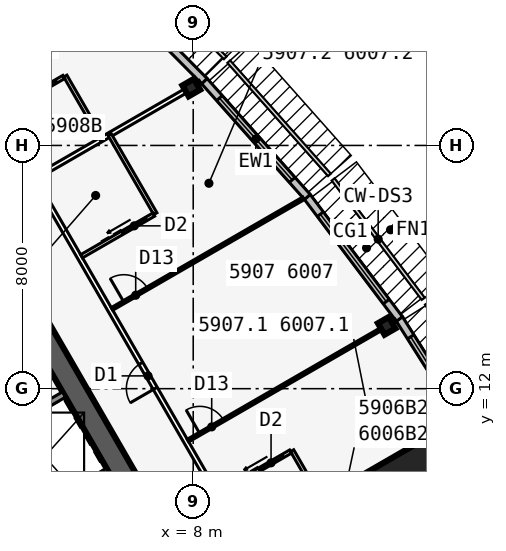
"""IFC4 building model, lengths in metres.
Left out: names, types, materials, properties, quantities, classifications, styles, units other than length and angle.
Written with IfcOpenShell. Run it as: python <this file> out.ifc"""

import sys

from ifc_helpers import new_model, si_unit, direction, frame, frame_2d, origin, origin_2d, place, context, subcontext, project, spatial, rectangle, i_section, extrude, element, fill, save


model = new_model("IFC4")
c1 = context("Model", 3, precision=1e-05, world=origin(), true_north=direction((0.0, 1.0)))
c2 = subcontext(c1, "Body", "Model", "MODEL_VIEW")
j1 = project(units=[si_unit("LENGTHUNIT", "METRE"), si_unit("PLANEANGLEUNIT", "RADIAN")], contexts=[c1])
p1 = place(None, origin())
s1 = spatial("IfcSite", under=j1, at=p1, CompositionType="ELEMENT")
p2 = place(p1, origin())
s2 = spatial("IfcBuilding", under=s1, at=p2, CompositionType="ELEMENT")
p3 = place(p2, frame((0.0, 0.0, 222.5)))
s3 = spatial("IfcBuildingStorey", under=s2, at=p3, CompositionType="ELEMENT", Elevation=222.5)
p4 = place(p3, frame((16.5, -9.526, 0.0), z_axis=(0.0, 0.0, 1.0), x_axis=(-0.499999749417, 0.866025548458, 0.0)))
e1 = element("IfcWall", 1, at=p4, inside=s3, PredefinedType="SHEAR", context=c2, shape_type="SweptSolid", body=[
    extrude(rectangle(XDim=33.0, YDim=0.75, at=frame_2d((16.5, 0.0))), origin(), (0.0, 0.0, 1.0), 3.6),
])
p5 = place(p4, frame((14.15, 0.0, 0.0)))
e2 = element("IfcOpeningElement", 2, at=p5, cuts=e1, PredefinedType="OPENING", context=c2, shape_type="SweptSolid", body=[
    extrude(rectangle(XDim=1.8, YDim=2.13, at=frame_2d((0.9, 1.065))), frame((0.0, 0.385, 0.0), z_axis=(0.0, -1.0, 0.0), x_axis=(1.0, 0.0, 0.0)), (0.0, 0.0, 1.0), 0.77),
])
p6 = place(p4, frame((12.6, 0.0, 0.0)))
e3 = element("IfcOpeningElement", 3, at=p6, cuts=e1, PredefinedType="OPENING", context=c2, shape_type="SweptSolid", body=[
    extrude(rectangle(XDim=1.0, YDim=2.13, at=frame_2d((0.5, 1.065))), frame((0.0, 0.385, 0.0), z_axis=(0.0, -1.0, 0.0), x_axis=(1.0, 0.0, 0.0)), (0.0, 0.0, 1.0), 0.77),
])
p7 = place(p3, frame((5.379, 2.586, 0.0), z_axis=(0.0, 0.0, 1.0), x_axis=(-0.500001375892, 0.866024609411, 0.0)))
e4 = element("IfcWall", 4, at=p7, inside=s3, PredefinedType="SOLIDWALL", context=c2, shape_type="SweptSolid", body=[
    extrude(rectangle(XDim=10.633, YDim=0.25, at=frame_2d((5.316, 0.0))), origin(), (0.0, 0.0, 1.0), 3.435),
])
p8 = place(p7, frame((9.164, 0.0, 0.0)))
e5 = element("IfcOpeningElement", 5, at=p8, cuts=e4, PredefinedType="OPENING", context=c2, shape_type="SweptSolid", body=[
    extrude(rectangle(XDim=0.9, YDim=2.13, at=frame_2d((0.45, 1.065))), frame((0.0, 0.135, 0.0), z_axis=(0.0, -1.0, 0.0), x_axis=(1.0, 0.0, 0.0)), (0.0, 0.0, 1.0), 0.27),
])
p9 = place(p7, frame((1.0, 0.0, 0.0)))
e6 = element("IfcOpeningElement", 6, at=p9, cuts=e4, PredefinedType="OPENING", context=c2, shape_type="SweptSolid", body=[
    extrude(rectangle(XDim=1.1, YDim=2.13, at=frame_2d((0.55, 1.065))), frame((0.0, 0.135, 0.0), z_axis=(0.0, -1.0, 0.0), x_axis=(1.0, 0.0, 0.0)), (0.0, 0.0, 1.0), 0.27),
])
p10 = place(p7, frame((3.9, 0.0, 0.0)))
e7 = element("IfcOpeningElement", 7, at=p10, cuts=e4, PredefinedType="OPENING", context=c2, shape_type="SweptSolid", body=[
    extrude(rectangle(XDim=1.1, YDim=2.13, at=frame_2d((0.55, 1.065))), frame((0.0, 0.135, 0.0), z_axis=(0.0, -1.0, 0.0), x_axis=(1.0, 0.0, 0.0)), (0.0, 0.0, 1.0), 0.27),
])
p11 = place(p7, frame((6.8, 0.0, 0.0)))
e8 = element("IfcOpeningElement", 8, at=p11, cuts=e4, PredefinedType="OPENING", context=c2, shape_type="SweptSolid", body=[
    extrude(rectangle(XDim=1.1, YDim=2.13, at=frame_2d((0.55, 1.065))), frame((0.0, 0.135, 0.0), z_axis=(0.0, -1.0, 0.0), x_axis=(1.0, 0.0, 0.0)), (0.0, 0.0, 1.0), 0.27),
])
for number, where, z_axis, x_axis in (
    (9, (2.429, 7.696, 0.0), (0.0, 0.0, 1.0), (0.866, 0.5, 0.0)),
    (10, (0.979, 10.207, 0.0), (0.0, 0.0, 1.0), (0.866, 0.5, 0.0)),
):
    element("IfcWall", number, at=place(p3, frame(where, z_axis=z_axis, x_axis=x_axis)), inside=s3, PredefinedType="SOLIDWALL", context=c2, shape_type="SweptSolid", body=[
        extrude(rectangle(XDim=3.2, YDim=0.2, at=frame_2d((1.6, 0.0))), origin(), (0.0, 0.0, 1.0), 3.435),
    ])
for number, where, z_axis, x_axis in (
    (11, (14.363, 14.066, 0.0), (0.0, 0.0, 1.0), (0.866, 0.5, 0.0)),
    (12, (7.937, 21.903, 0.0), (0.0, 0.0, 1.0), (-0.5, 0.866, 0.0)),
):
    element("IfcColumn", number, at=place(p3, frame(where, z_axis=z_axis, x_axis=x_axis)), inside=s3, PredefinedType="COLUMN", context=c2, shape_type="SweptSolid", body=[
        extrude(i_section(OverallWidth=0.411, OverallDepth=0.434, WebThickness=0.036, FlangeThickness=0.057, at=origin_2d()), origin(), (0.0, 0.0, 1.0), 3.6),
    ])
p12 = place(p3, frame((15.312, 8.84, 0.0), z_axis=(0.0, 0.0, 1.0), x_axis=(0.866025403784, 0.5, 0.0)))
e13 = element("IfcColumn", 13, at=p12, inside=s3, PredefinedType="COLUMN", context=c2, shape_type="SweptSolid", body=[
    extrude(rectangle(XDim=2.3, YDim=2.3, at=origin_2d()), origin(), (0.0, 0.0, 1.0), 3.6),
])
p13 = place(p3, frame((17.456, 10.072, 0.0), z_axis=(0.0, 0.0, 1.0), x_axis=(-0.535220361449, 0.844712474568, 0.0)))
e14 = element("IfcWall", 14, at=p13, inside=s3, PredefinedType="STANDARD", context=c2, shape_type="SweptSolid", body=[
    extrude(rectangle(XDim=5.004, YDim=0.25, at=frame_2d((2.502, 0.0))), origin(), (0.0, 0.0, 1.0), 3.435),
])
p14 = place(p13, frame((0.702, 0.0, 0.45)))
e15 = element("IfcOpeningElement", 15, at=p14, cuts=e14, PredefinedType="OPENING", context=c2, shape_type="SweptSolid", body=[
    extrude(rectangle(XDim=3.6, YDim=2.6, at=frame_2d((1.8, 1.3))), frame((0.0, 0.135, 0.0), z_axis=(0.0, -1.0, 0.0), x_axis=(1.0, 0.0, 0.0)), (0.0, 0.0, 1.0), 0.27),
])
p15 = place(p3, frame((14.783, 14.291, 0.0), z_axis=(0.0, 0.0, 1.0), x_axis=(-0.602408653511, 0.798187831388, 0.0)))
e16 = element("IfcWall", 16, at=p15, inside=s3, PredefinedType="STANDARD", context=c2, shape_type="SweptSolid", body=[
    extrude(rectangle(XDim=5.038, YDim=0.25, at=frame_2d((2.519, 0.0))), origin(), (0.0, 0.0, 1.0), 3.435),
])
p16 = place(p15, frame((0.719, 0.0, 0.45)))
e17 = element("IfcOpeningElement", 17, at=p16, cuts=e16, PredefinedType="OPENING", context=c2, shape_type="SweptSolid", body=[
    extrude(rectangle(XDim=3.6, YDim=2.6, at=frame_2d((1.8, 1.3))), frame((0.0, 0.135, 0.0), z_axis=(0.0, -1.0, 0.0), x_axis=(1.0, 0.0, 0.0)), (0.0, 0.0, 1.0), 0.27),
])
p17 = place(p3, frame((11.754, 18.304, 0.0), z_axis=(0.0, 0.0, 1.0), x_axis=(-0.664348996191, 0.747422511876, 0.0)))
e18 = element("IfcWall", 18, at=p17, inside=s3, PredefinedType="STANDARD", context=c2, shape_type="SweptSolid", body=[
    extrude(rectangle(XDim=5.105, YDim=0.25, at=frame_2d((2.552, 0.0))), origin(), (0.0, 0.0, 1.0), 3.435),
])
p18 = place(p17, frame((0.752, 0.0, 0.45)))
e19 = element("IfcOpeningElement", 19, at=p18, cuts=e18, PredefinedType="OPENING", context=c2, shape_type="SweptSolid", body=[
    extrude(rectangle(XDim=3.6, YDim=2.6, at=frame_2d((1.8, 1.3))), frame((0.0, 0.135, 0.0), z_axis=(0.0, -1.0, 0.0), x_axis=(1.0, 0.0, 0.0)), (0.0, 0.0, 1.0), 0.27),
])
p19 = place(p3, frame((8.368, 22.115, 0.0), z_axis=(0.0, 0.0, 1.0), x_axis=(-0.704149946111, 0.710051303352, 0.0)))
e20 = element("IfcWall", 20, at=p19, inside=s3, PredefinedType="STANDARD", context=c2, shape_type="SweptSolid", body=[
    extrude(rectangle(XDim=2.069, YDim=0.25, at=frame_2d((1.034, 0.0))), origin(), (0.0, 0.0, 1.0), 3.435),
])
p20 = place(p3, frame((20.102, -11.115, 0.0), z_axis=(0.0, 0.0, 1.0), x_axis=(-0.500000265775, 0.866025250339, 0.0)))
e21 = element("IfcWall", 21, at=p20, inside=s3, PredefinedType="PARTITIONING", context=c2, shape_type="SweptSolid", body=[
    extrude(rectangle(XDim=39.354, YDim=0.15, at=frame_2d((19.677, 0.0))), origin(), (0.0, 0.0, 1.0), 3.435),
])
p21 = place(p20, frame((1.102, 0.0, 0.0)))
e22 = element("IfcOpeningElement", 22, at=p21, cuts=e21, PredefinedType="OPENING", context=c2, shape_type="SweptSolid", body=[
    extrude(rectangle(XDim=0.95, YDim=2.13, at=frame_2d((0.475, 1.065))), frame((0.0, 0.085, 0.0), z_axis=(0.0, -1.0, 0.0), x_axis=(1.0, 0.0, 0.0)), (0.0, 0.0, 1.0), 0.17),
])
p22 = place(p20, frame((11.702, 0.0, 0.0)))
e23 = element("IfcOpeningElement", 23, at=p22, cuts=e21, PredefinedType="OPENING", context=c2, shape_type="SweptSolid", body=[
    extrude(rectangle(XDim=0.95, YDim=2.13, at=frame_2d((0.475, 1.065))), frame((0.0, 0.085, 0.0), z_axis=(0.0, -1.0, 0.0), x_axis=(1.0, 0.0, 0.0)), (0.0, 0.0, 1.0), 0.17),
])
p23 = place(p20, frame((26.702, 0.0, 0.0)))
e24 = element("IfcOpeningElement", 24, at=p23, cuts=e21, PredefinedType="OPENING", context=c2, shape_type="SweptSolid", body=[
    extrude(rectangle(XDim=0.95, YDim=2.13, at=frame_2d((0.475, 1.065))), frame((0.0, 0.085, 0.0), z_axis=(0.0, -1.0, 0.0), x_axis=(1.0, 0.0, 0.0)), (0.0, 0.0, 1.0), 0.17),
])
p24 = place(p20, frame((37.302, 0.0, 0.0)))
e25 = element("IfcOpeningElement", 25, at=p24, cuts=e21, PredefinedType="OPENING", context=c2, shape_type="SweptSolid", body=[
    extrude(rectangle(XDim=0.95, YDim=2.13, at=frame_2d((0.475, 1.065))), frame((0.0, 0.085, 0.0), z_axis=(0.0, -1.0, 0.0), x_axis=(1.0, 0.0, 0.0)), (0.0, 0.0, 1.0), 0.17),
])
p25 = place(p3, frame((10.329, 5.963, 0.0), z_axis=(0.0, 0.0, 1.0), x_axis=(0.866016460812, 0.500015489362, 0.0)))
e26 = element("IfcWall", 26, at=p25, inside=s3, PredefinedType="PARTITIONING", context=c2, shape_type="SweptSolid", body=[
    extrude(rectangle(XDim=8.101, YDim=0.15, at=frame_2d((4.051, 0.0))), origin(), (0.0, 0.0, 1.0), 2.589),
])
p26 = place(p3, frame((7.829, 10.293, 0.0), z_axis=(0.0, 0.0, 1.0), x_axis=(0.866030558329, 0.49999107196, 0.0)))
e27 = element("IfcWall", 27, at=p26, inside=s3, PredefinedType="PARTITIONING", context=c2, shape_type="SweptSolid", body=[
    extrude(rectangle(XDim=7.894, YDim=0.1, at=frame_2d((3.947, 0.0))), origin(), (0.0, 0.0, 1.0), 2.589),
])
p27 = place(p26, frame((0.45, 0.0, 0.0)))
e28 = element("IfcOpeningElement", 28, at=p27, cuts=e27, PredefinedType="OPENING", context=c2, shape_type="SweptSolid", body=[
    extrude(rectangle(XDim=0.9, YDim=2.13, at=frame_2d((0.45, 1.065))), frame((0.0, 0.06, 0.0), z_axis=(0.0, -1.0, 0.0), x_axis=(1.0, 0.0, 0.0)), (0.0, 0.0, 1.0), 0.12),
])
p28 = place(p3, frame((5.329, 14.623, 0.0), z_axis=(0.0, 0.0, 1.0), x_axis=(0.866017877653, 0.500013035415, 0.0)))
e29 = element("IfcWall", 29, at=p28, inside=s3, PredefinedType="PARTITIONING", context=c2, shape_type="SweptSolid", body=[
    extrude(rectangle(XDim=7.273, YDim=0.1, at=frame_2d((3.636, 0.0))), origin(), (0.0, 0.0, 1.0), 2.589),
])
p29 = place(p28, frame((0.45, 0.0, 0.0)))
e30 = element("IfcOpeningElement", 30, at=p29, cuts=e29, PredefinedType="OPENING", context=c2, shape_type="SweptSolid", body=[
    extrude(rectangle(XDim=0.9, YDim=2.13, at=frame_2d((0.45, 1.065))), frame((0.0, 0.06, 0.0), z_axis=(0.0, -1.0, 0.0), x_axis=(1.0, 0.0, 0.0)), (0.0, 0.0, 1.0), 0.12),
])
p30 = place(p3, frame((2.829, 18.954, 0.0), z_axis=(0.0, 0.0, 1.0), x_axis=(0.866026604282, 0.499997920671, 0.0)))
e31 = element("IfcWall", 31, at=p30, inside=s3, PredefinedType="PARTITIONING", context=c2, shape_type="SweptSolid", body=[
    extrude(rectangle(XDim=6.24, YDim=0.15, at=frame_2d((3.12, 0.0))), origin(), (0.0, 0.0, 1.0), 2.589),
])
p31 = place(p3, frame((12.753, 7.363, 0.0), z_axis=(0.0, 0.0, 1.0), x_axis=(-0.499990139034, 0.866031096941, 0.0)))
e32 = element("IfcWall", 32, at=p31, inside=s3, PredefinedType="PLUMBINGWALL", context=c2, shape_type="SweptSolid", body=[
    extrude(rectangle(XDim=3.0, YDim=0.12, at=frame_2d((1.5, 0.0))), origin(), (0.0, 0.0, 1.0), 3.435),
])
p32 = place(p3, frame((8.829, 8.561, 0.0), z_axis=(0.0, 0.0, 1.0), x_axis=(0.866035715982, 0.499982138324, 0.0)))
e33 = element("IfcWall", 33, at=p32, inside=s3, PredefinedType="PLUMBINGWALL", context=c2, shape_type="SweptSolid", body=[
    extrude(rectangle(XDim=2.74, YDim=0.12, at=frame_2d((1.37, 0.0))), origin(), (0.0, 0.0, 1.0), 3.435),
])
p33 = place(p32, frame((1.55, 0.0, 0.0)))
e34 = element("IfcOpeningElement", 34, at=p33, cuts=e33, PredefinedType="OPENING", context=c2, shape_type="SweptSolid", body=[
    extrude(rectangle(XDim=0.9, YDim=2.13, at=frame_2d((0.45, 1.065))), frame((0.0, 0.07, 0.0), z_axis=(0.0, -1.0, 0.0), x_axis=(1.0, 0.0, 0.0)), (0.0, 0.0, 1.0), 0.14),
])
p34 = place(p3, frame((6.753, 17.755, 0.0), z_axis=(0.0, 0.0, 1.0), x_axis=(-0.499990139034, 0.866031096941, 0.0)))
e35 = element("IfcWall", 35, at=p34, inside=s3, PredefinedType="PLUMBINGWALL", context=c2, shape_type="SweptSolid", body=[
    extrude(rectangle(XDim=3.0, YDim=0.12, at=frame_2d((1.5, 0.0))), origin(), (0.0, 0.0, 1.0), 3.435),
])
p35 = place(p3, frame((4.329, 16.355, 0.0), z_axis=(0.0, 0.0, 1.0), x_axis=(0.866035715982, 0.499982138324, 0.0)))
e36 = element("IfcWall", 36, at=p35, inside=s3, PredefinedType="PLUMBINGWALL", context=c2, shape_type="SweptSolid", body=[
    extrude(rectangle(XDim=2.74, YDim=0.12, at=frame_2d((1.37, 0.0))), origin(), (0.0, 0.0, 1.0), 3.435),
])
p36 = place(p35, frame((1.55, 0.0, 0.0)))
e37 = element("IfcOpeningElement", 37, at=p36, cuts=e36, PredefinedType="OPENING", context=c2, shape_type="SweptSolid", body=[
    extrude(rectangle(XDim=0.9, YDim=2.13, at=frame_2d((0.45, 1.065))), frame((0.0, 0.07, 0.0), z_axis=(0.0, -1.0, 0.0), x_axis=(1.0, 0.0, 0.0)), (0.0, 0.0, 1.0), 0.14),
])
p37 = place(p3, frame((4.993, 20.204, 0.0), z_axis=(0.0, 0.0, 1.0), x_axis=(-0.500001309137, 0.866024647952, 0.0)))
e38 = element("IfcWall", 38, at=p37, inside=s3, PredefinedType="PLUMBINGWALL", context=c2, shape_type="SweptSolid", body=[
    extrude(rectangle(XDim=2.4, YDim=0.12, at=frame_2d((1.2, 0.0))), origin(), (0.0, 0.0, 1.0), 3.435),
])
p38 = place(p3, frame((1.628, 21.032, 0.0), z_axis=(0.0, 0.0, 1.0), x_axis=(0.866048967903, 0.499959183527, 0.0)))
e39 = element("IfcWall", 39, at=p38, inside=s3, PredefinedType="PLUMBINGWALL", context=c2, shape_type="SweptSolid", body=[
    extrude(rectangle(XDim=2.44, YDim=0.12, at=frame_2d((1.22, 0.0))), origin(), (0.0, 0.0, 1.0), 3.435),
])
p39 = place(p38, frame((1.25, 0.0, 0.0)))
e40 = element("IfcOpeningElement", 40, at=p39, cuts=e39, PredefinedType="OPENING", context=c2, shape_type="SweptSolid", body=[
    extrude(rectangle(XDim=0.9, YDim=2.13, at=frame_2d((0.45, 1.065))), frame((0.0, 0.07, 0.0), z_axis=(0.0, -1.0, 0.0), x_axis=(1.0, 0.0, 0.0)), (0.0, 0.0, 1.0), 0.14),
])
p40 = place(p14, origin())
e41 = element("IfcWindow", 41, at=p40, inside=s3, PartitioningType="SINGLE_PANEL", PredefinedType="WINDOW", context=c2, shape_type="SweptSolid", body=[
    extrude(rectangle(XDim=3.6, YDim=2.6, at=frame_2d((1.8, 1.3))), frame((0.0, 0.03, 0.0), z_axis=(0.0, -1.0, 0.0), x_axis=(1.0, 0.0, 0.0)), (0.0, 0.0, 1.0), 0.06),
])
fill(e15, e41)
p41 = place(p16, origin())
e42 = element("IfcWindow", 42, at=p41, inside=s3, PartitioningType="SINGLE_PANEL", PredefinedType="WINDOW", context=c2, shape_type="SweptSolid", body=[
    extrude(rectangle(XDim=3.6, YDim=2.6, at=frame_2d((1.8, 1.3))), frame((0.0, 0.03, 0.0), z_axis=(0.0, -1.0, 0.0), x_axis=(1.0, 0.0, 0.0)), (0.0, 0.0, 1.0), 0.06),
])
fill(e17, e42)
p42 = place(p18, origin())
e43 = element("IfcWindow", 43, at=p42, inside=s3, PartitioningType="SINGLE_PANEL", PredefinedType="WINDOW", context=c2, shape_type="SweptSolid", body=[
    extrude(rectangle(XDim=3.6, YDim=2.6, at=frame_2d((1.8, 1.3))), frame((0.0, 0.03, 0.0), z_axis=(0.0, -1.0, 0.0), x_axis=(1.0, 0.0, 0.0)), (0.0, 0.0, 1.0), 0.06),
])
fill(e19, e43)
p43 = place(p27, origin())
e44 = element("IfcDoor", 44, at=p43, inside=s3, OperationType="SINGLE_SWING_LEFT", PredefinedType="DOOR", context=c2, shape_type="SweptSolid", body=[
    extrude(rectangle(XDim=0.9, YDim=2.13, at=frame_2d((0.45, 1.065))), frame((0.0, 0.025, 0.0), z_axis=(0.0, -1.0, 0.0), x_axis=(1.0, 0.0, 0.0)), (0.0, 0.0, 1.0), 0.05),
])
fill(e28, e44)
p44 = place(p29, origin())
e45 = element("IfcDoor", 45, at=p44, inside=s3, OperationType="SINGLE_SWING_LEFT", PredefinedType="DOOR", context=c2, shape_type="SweptSolid", body=[
    extrude(rectangle(XDim=0.9, YDim=2.13, at=frame_2d((0.45, 1.065))), frame((0.0, 0.025, 0.0), z_axis=(0.0, -1.0, 0.0), x_axis=(1.0, 0.0, 0.0)), (0.0, 0.0, 1.0), 0.05),
])
fill(e30, e45)
p45 = place(p33, origin())
e46 = element("IfcDoor", 46, at=p45, inside=s3, OperationType="SLIDING_TO_LEFT", PredefinedType="DOOR", context=c2, shape_type="SweptSolid", body=[
    extrude(rectangle(XDim=0.9, YDim=2.13, at=frame_2d((0.45, 1.065))), frame((0.0, 0.025, 0.0), z_axis=(0.0, -1.0, 0.0), x_axis=(1.0, 0.0, 0.0)), (0.0, 0.0, 1.0), 0.05),
])
fill(e34, e46)
p46 = place(p23, origin())
e47 = element("IfcDoor", 47, at=p46, inside=s3, OperationType="SINGLE_SWING_LEFT", PredefinedType="DOOR", context=c2, shape_type="SweptSolid", body=[
    extrude(rectangle(XDim=0.95, YDim=2.13, at=frame_2d((0.475, 1.065))), frame((0.0, 0.025, 0.0), z_axis=(0.0, -1.0, 0.0), x_axis=(1.0, 0.0, 0.0)), (0.0, 0.0, 1.0), 0.05),
])
fill(e24, e47)
p47 = place(p36, origin())
e48 = element("IfcDoor", 48, at=p47, inside=s3, OperationType="SLIDING_TO_LEFT", PredefinedType="DOOR", context=c2, shape_type="SweptSolid", body=[
    extrude(rectangle(XDim=0.9, YDim=2.13, at=frame_2d((0.45, 1.065))), frame((0.0, 0.025, 0.0), z_axis=(0.0, -1.0, 0.0), x_axis=(1.0, 0.0, 0.0)), (0.0, 0.0, 1.0), 0.05),
])
fill(e37, e48)
p48 = place(p39, origin())
e49 = element("IfcDoor", 49, at=p48, inside=s3, OperationType="SLIDING_TO_LEFT", PredefinedType="DOOR", context=c2, shape_type="SweptSolid", body=[
    extrude(rectangle(XDim=0.9, YDim=2.13, at=frame_2d((0.45, 1.065))), frame((0.0, 0.025, 0.0), z_axis=(0.0, -1.0, 0.0), x_axis=(1.0, 0.0, 0.0)), (0.0, 0.0, 1.0), 0.05),
])
fill(e40, e49)
save(model, sys.argv[1])
